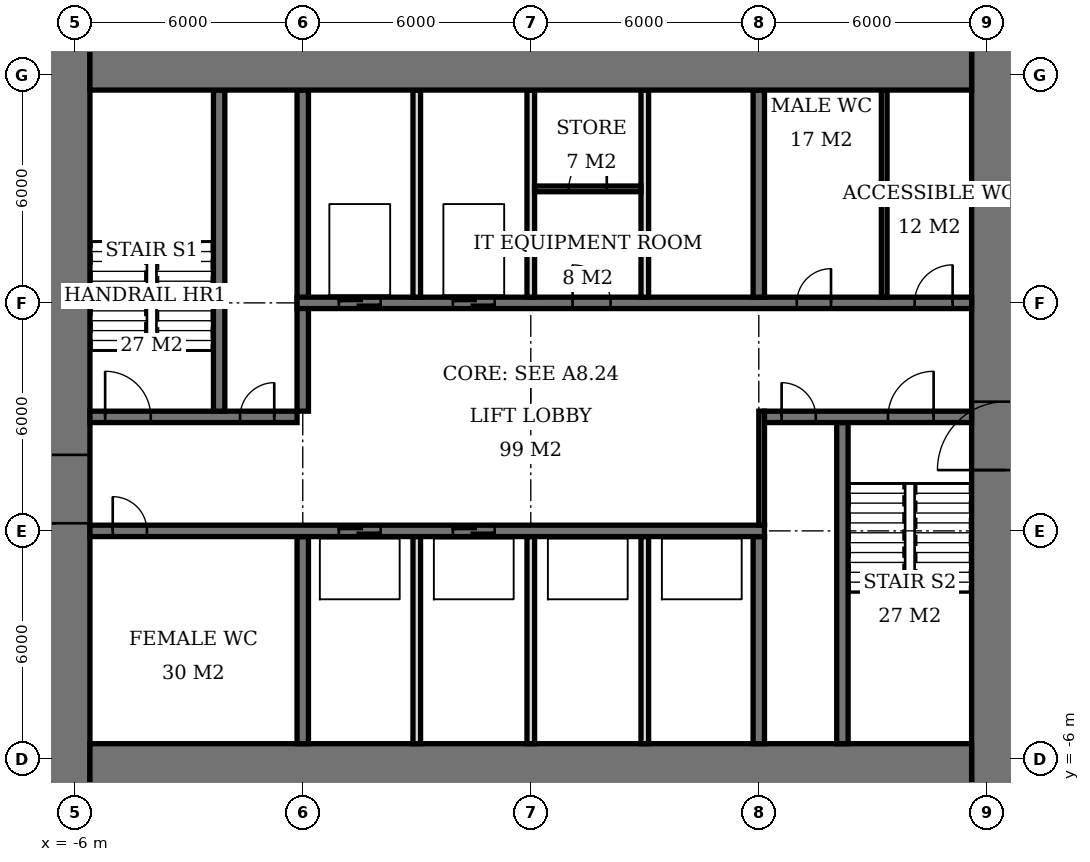
"""IFC4 building model, lengths in metres.
Left out: names, types, materials, properties, quantities, classifications, styles, units other than length and angle.
Written with IfcOpenShell. Run it as: python <this file> out.ifc"""

import sys

from ifc_helpers import new_model, si_unit, direction, frame, frame_2d, origin, place, context, subcontext, project, spatial, rectangle, extrude, element, fill, save


model = new_model("IFC4")
c1 = context("Model", 3, precision=1e-05, world=origin(), true_north=direction((0.0, 1.0)))
c2 = subcontext(c1, "Body", "Model", "MODEL_VIEW")
j1 = project(units=[si_unit("LENGTHUNIT", "METRE"), si_unit("PLANEANGLEUNIT", "RADIAN")], contexts=[c1])
p1 = place(None, origin())
s1 = spatial("IfcSite", under=j1, at=p1, CompositionType="ELEMENT")
p2 = place(p1, origin())
s2 = spatial("IfcBuilding", under=s1, at=p2, CompositionType="ELEMENT")
p3 = place(p2, frame((0.0, 0.0, 128.9)))
s3 = spatial("IfcBuildingStorey", under=s2, at=p3, CompositionType="ELEMENT", Elevation=128.9)
for number, where, z_axis, x_axis in (
    (1, (-5.6, -6.6, 0.0), (0.0, 0.0, 1.0), (1.0, 0.0, 0.0)),
    (2, (-5.6, 12.6, 0.0), (0.0, 0.0, 1.0), (1.0, 0.0, 0.0)),
):
    element("IfcWall", number, at=place(p3, frame(where, z_axis=z_axis, x_axis=x_axis)), inside=s3, PredefinedType="SHEAR", context=c2, shape_type="SweptSolid", body=[
        extrude(rectangle(XDim=23.2, YDim=2.0, at=frame_2d((11.6, 0.0))), origin(), (0.0, 0.0, 1.0), 3.9),
    ])
p4 = place(p3, frame((-6.5, -7.6, 0.0), z_axis=(0.0, 0.0, 1.0), x_axis=(0.0, 1.0, 0.0)))
e3 = element("IfcWall", 3, at=p4, inside=s3, PredefinedType="SHEAR", context=c2, shape_type="SweptSolid", body=[
    extrude(rectangle(XDim=21.2, YDim=1.8, at=frame_2d((10.6, 0.0))), origin(), (0.0, 0.0, 1.0), 3.9),
])
p5 = place(p4, frame((7.8, 0.0, 0.0)))
e4 = element("IfcOpeningElement", 4, at=p5, cuts=e3, PredefinedType="OPENING", context=c2, shape_type="SweptSolid", body=[
    extrude(rectangle(XDim=1.8, YDim=2.4, at=frame_2d((0.9, 1.2))), frame((0.0, 0.91, 0.0), z_axis=(0.0, -1.0, 0.0), x_axis=(1.0, 0.0, 0.0)), (0.0, 0.0, 1.0), 1.82),
])
p6 = place(p3, frame((18.5, -7.6, 0.0), z_axis=(0.0, 0.0, 1.0), x_axis=(0.0, 1.0, 0.0)))
e5 = element("IfcWall", 5, at=p6, inside=s3, PredefinedType="SHEAR", context=c2, shape_type="SweptSolid", body=[
    extrude(rectangle(XDim=21.2, YDim=1.8, at=frame_2d((10.6, 0.0))), origin(), (0.0, 0.0, 1.0), 3.9),
])
p7 = place(p6, frame((9.2, 0.0, 0.0)))
e6 = element("IfcOpeningElement", 6, at=p7, cuts=e5, PredefinedType="OPENING", context=c2, shape_type="SweptSolid", body=[
    extrude(rectangle(XDim=1.8, YDim=2.4, at=frame_2d((0.9, 1.2))), frame((0.0, 0.91, 0.0), z_axis=(0.0, -1.0, 0.0), x_axis=(1.0, 0.0, 0.0)), (0.0, 0.0, 1.0), 1.82),
])
p8 = place(p3, frame((-5.6, 0.0, 0.0), z_axis=(0.0, 0.0, 1.0), x_axis=(1.0, 0.0, 0.0)))
e7 = element("IfcWall", 7, at=p8, inside=s3, PredefinedType="SHEAR", context=c2, shape_type="SweptSolid", body=[
    extrude(rectangle(XDim=17.75, YDim=0.3, at=frame_2d((8.875, 0.0))), origin(), (0.0, 0.0, 1.0), 3.9),
])
p9 = place(p8, frame((0.6, 0.0, 0.0)))
e8 = element("IfcOpeningElement", 8, at=p9, cuts=e7, PredefinedType="OPENING", context=c2, shape_type="SweptSolid", body=[
    extrude(rectangle(XDim=0.9, YDim=2.1, at=frame_2d((0.45, 1.05))), frame((0.0, 0.16, 0.0), z_axis=(0.0, -1.0, 0.0), x_axis=(1.0, 0.0, 0.0)), (0.0, 0.0, 1.0), 0.32),
])
p10 = place(p8, frame((6.55, 0.0, 0.0)))
e9 = element("IfcOpeningElement", 9, at=p10, cuts=e7, PredefinedType="OPENING", context=c2, shape_type="SweptSolid", body=[
    extrude(rectangle(XDim=1.1, YDim=2.1, at=frame_2d((0.55, 1.05))), frame((0.0, 0.16, 0.0), z_axis=(0.0, -1.0, 0.0), x_axis=(1.0, 0.0, 0.0)), (0.0, 0.0, 1.0), 0.32),
])
p11 = place(p8, frame((9.55, 0.0, 0.0)))
e10 = element("IfcOpeningElement", 10, at=p11, cuts=e7, PredefinedType="OPENING", context=c2, shape_type="SweptSolid", body=[
    extrude(rectangle(XDim=1.1, YDim=2.1, at=frame_2d((0.55, 1.05))), frame((0.0, 0.16, 0.0), z_axis=(0.0, -1.0, 0.0), x_axis=(1.0, 0.0, 0.0)), (0.0, 0.0, 1.0), 0.32),
])
p12 = place(p3, frame((-5.6, 3.0, 0.0), z_axis=(0.0, 0.0, 1.0), x_axis=(1.0, 0.0, 0.0)))
e11 = element("IfcWall", 11, at=p12, inside=s3, PredefinedType="SHEAR", context=c2, shape_type="SweptSolid", body=[
    extrude(rectangle(XDim=5.45, YDim=0.3, at=frame_2d((2.725, 0.0))), origin(), (0.0, 0.0, 1.0), 3.9),
])
p13 = place(p12, frame((0.4, 0.0, 0.0)))
e12 = element("IfcOpeningElement", 12, at=p13, cuts=e11, PredefinedType="OPENING", context=c2, shape_type="SweptSolid", body=[
    extrude(rectangle(XDim=1.2, YDim=2.1, at=frame_2d((0.6, 1.05))), frame((0.0, 0.16, 0.0), z_axis=(0.0, -1.0, 0.0), x_axis=(1.0, 0.0, 0.0)), (0.0, 0.0, 1.0), 0.32),
])
p14 = place(p12, frame((3.95, 0.0, 0.0)))
e13 = element("IfcOpeningElement", 13, at=p14, cuts=e11, PredefinedType="OPENING", context=c2, shape_type="SweptSolid", body=[
    extrude(rectangle(XDim=0.9, YDim=2.1, at=frame_2d((0.45, 1.05))), frame((0.0, 0.16, 0.0), z_axis=(0.0, -1.0, 0.0), x_axis=(1.0, 0.0, 0.0)), (0.0, 0.0, 1.0), 0.32),
])
p15 = place(p3, frame((12.15, 3.0, 0.0), z_axis=(0.0, 0.0, 1.0), x_axis=(1.0, 0.0, 0.0)))
e14 = element("IfcWall", 14, at=p15, inside=s3, PredefinedType="SHEAR", context=c2, shape_type="SweptSolid", body=[
    extrude(rectangle(XDim=5.45, YDim=0.3, at=frame_2d((2.725, 0.0))), origin(), (0.0, 0.0, 1.0), 3.9),
])
p16 = place(p15, frame((3.25, 0.0, 0.0)))
e15 = element("IfcOpeningElement", 15, at=p16, cuts=e14, PredefinedType="OPENING", context=c2, shape_type="SweptSolid", body=[
    extrude(rectangle(XDim=1.2, YDim=2.1, at=frame_2d((0.6, 1.05))), frame((0.0, 0.16, 0.0), z_axis=(0.0, -1.0, 0.0), x_axis=(1.0, 0.0, 0.0)), (0.0, 0.0, 1.0), 0.32),
])
p17 = place(p15, frame((0.45, 0.0, 0.0)))
e16 = element("IfcOpeningElement", 16, at=p17, cuts=e14, PredefinedType="OPENING", context=c2, shape_type="SweptSolid", body=[
    extrude(rectangle(XDim=0.9, YDim=2.1, at=frame_2d((0.45, 1.05))), frame((0.0, 0.16, 0.0), z_axis=(0.0, -1.0, 0.0), x_axis=(1.0, 0.0, 0.0)), (0.0, 0.0, 1.0), 0.32),
])
p18 = place(p3, frame((-0.15, 6.0, 0.0), z_axis=(0.0, 0.0, 1.0), x_axis=(1.0, 0.0, 0.0)))
e17 = element("IfcWall", 17, at=p18, inside=s3, PredefinedType="SHEAR", context=c2, shape_type="SweptSolid", body=[
    extrude(rectangle(XDim=17.75, YDim=0.3, at=frame_2d((8.875, 0.0))), origin(), (0.0, 0.0, 1.0), 3.9),
])
p19 = place(p18, frame((13.15, 0.0, 0.0)))
e18 = element("IfcOpeningElement", 18, at=p19, cuts=e17, PredefinedType="OPENING", context=c2, shape_type="SweptSolid", body=[
    extrude(rectangle(XDim=0.9, YDim=2.1, at=frame_2d((0.45, 1.05))), frame((0.0, 0.16, 0.0), z_axis=(0.0, -1.0, 0.0), x_axis=(1.0, 0.0, 0.0)), (0.0, 0.0, 1.0), 0.32),
])
p20 = place(p18, frame((16.25, 0.0, 0.0)))
e19 = element("IfcOpeningElement", 19, at=p20, cuts=e17, PredefinedType="OPENING", context=c2, shape_type="SweptSolid", body=[
    extrude(rectangle(XDim=1.0, YDim=2.1, at=frame_2d((0.5, 1.05))), frame((0.0, 0.16, 0.0), z_axis=(0.0, -1.0, 0.0), x_axis=(1.0, 0.0, 0.0)), (0.0, 0.0, 1.0), 0.32),
])
p21 = place(p18, frame((7.25, 0.0, 0.0)))
e20 = element("IfcOpeningElement", 20, at=p21, cuts=e17, PredefinedType="OPENING", context=c2, shape_type="SweptSolid", body=[
    extrude(rectangle(XDim=1.0, YDim=2.1, at=frame_2d((0.5, 1.05))), frame((0.0, 0.16, 0.0), z_axis=(0.0, -1.0, 0.0), x_axis=(1.0, 0.0, 0.0)), (0.0, 0.0, 1.0), 0.32),
])
p22 = place(p18, frame((1.1, 0.0, 0.0)))
e21 = element("IfcOpeningElement", 21, at=p22, cuts=e17, PredefinedType="OPENING", context=c2, shape_type="SweptSolid", body=[
    extrude(rectangle(XDim=1.1, YDim=2.1, at=frame_2d((0.55, 1.05))), frame((0.0, 0.16, 0.0), z_axis=(0.0, -1.0, 0.0), x_axis=(1.0, 0.0, 0.0)), (0.0, 0.0, 1.0), 0.32),
])
p23 = place(p18, frame((4.1, 0.0, 0.0)))
e22 = element("IfcOpeningElement", 22, at=p23, cuts=e17, PredefinedType="OPENING", context=c2, shape_type="SweptSolid", body=[
    extrude(rectangle(XDim=1.1, YDim=2.1, at=frame_2d((0.55, 1.05))), frame((0.0, 0.16, 0.0), z_axis=(0.0, -1.0, 0.0), x_axis=(1.0, 0.0, 0.0)), (0.0, 0.0, 1.0), 0.32),
])
p24 = place(p3, frame((0.0, -5.6, 0.0), z_axis=(0.0, 0.0, 1.0), x_axis=(0.0, 1.0, 0.0)))
e23 = element("IfcWall", 23, at=p24, inside=s3, PredefinedType="SHEAR", context=c2, shape_type="SweptSolid", body=[
    extrude(rectangle(XDim=5.45, YDim=0.3, at=frame_2d((2.725, 0.0))), origin(), (0.0, 0.0, 1.0), 3.9),
])
p25 = place(p3, frame((0.0, 3.15, 0.0), z_axis=(0.0, 0.0, 1.0), x_axis=(0.0, 1.0, 0.0)))
e24 = element("IfcWall", 24, at=p25, inside=s3, PredefinedType="SHEAR", context=c2, shape_type="SweptSolid", body=[
    extrude(rectangle(XDim=8.45, YDim=0.3, at=frame_2d((4.225, 0.0))), origin(), (0.0, 0.0, 1.0), 3.9),
])
for number, where, z_axis, x_axis in (
    (25, (12.0, -5.6, 0.0), (0.0, 0.0, 1.0), (0.0, 1.0, 0.0)),
    (26, (12.0, 6.15, 0.0), (0.0, 0.0, 1.0), (0.0, 1.0, 0.0)),
):
    element("IfcWall", number, at=place(p3, frame(where, z_axis=z_axis, x_axis=x_axis)), inside=s3, PredefinedType="SHEAR", context=c2, shape_type="SweptSolid", body=[
        extrude(rectangle(XDim=5.45, YDim=0.3, at=frame_2d((2.725, 0.0))), origin(), (0.0, 0.0, 1.0), 3.9),
    ])
for number, where, z_axis, x_axis in (
    (27, (-2.2, 3.15, 0.0), (0.0, 0.0, 1.0), (0.0, 1.0, 0.0)),
    (28, (14.2, -5.6, 0.0), (0.0, 0.0, 1.0), (0.0, 1.0, 0.0)),
):
    element("IfcWall", number, at=place(p3, frame(where, z_axis=z_axis, x_axis=x_axis)), inside=s3, PredefinedType="SHEAR", context=c2, shape_type="SweptSolid", body=[
        extrude(rectangle(XDim=8.45, YDim=0.3, at=frame_2d((4.225, 0.0))), origin(), (0.0, 0.0, 1.0), 3.9),
    ])
for number, where, z_axis, x_axis in (
    (29, (3.0, 6.15, 0.0), (0.0, 0.0, 1.0), (0.0, 1.0, 0.0)),
    (30, (6.0, 6.15, 0.0), (0.0, 0.0, 1.0), (0.0, 1.0, 0.0)),
    (31, (9.0, 6.15, 0.0), (0.0, 0.0, 1.0), (0.0, 1.0, 0.0)),
    (32, (3.0, -5.6, 0.0), (0.0, 0.0, 1.0), (0.0, 1.0, 0.0)),
    (33, (6.0, -5.6, 0.0), (0.0, 0.0, 1.0), (0.0, 1.0, 0.0)),
    (34, (9.0, -5.6, 0.0), (0.0, 0.0, 1.0), (0.0, 1.0, 0.0)),
):
    element("IfcWall", number, at=place(p3, frame(where, z_axis=z_axis, x_axis=x_axis)), inside=s3, PredefinedType="SOLIDWALL", context=c2, shape_type="SweptSolid", body=[
        extrude(rectangle(XDim=5.45, YDim=0.2, at=frame_2d((2.725, 0.0))), origin(), (0.0, 0.0, 1.0), 3.9),
    ])
p26 = place(p3, frame((15.3, 6.15, 0.0), z_axis=(0.0, 0.0, 1.0), x_axis=(0.0, 1.0, 0.0)))
e35 = element("IfcWall", 35, at=p26, inside=s3, PredefinedType="PLUMBINGWALL", context=c2, shape_type="SweptSolid", body=[
    extrude(rectangle(XDim=5.45, YDim=0.15, at=frame_2d((2.725, 0.0))), origin(), (0.0, 0.0, 1.0), 3.65),
])
p27 = place(p3, frame((6.1, 9.0, 0.0), z_axis=(0.0, 0.0, 1.0), x_axis=(1.0, 0.0, 0.0)))
e36 = element("IfcWall", 36, at=p27, inside=s3, PredefinedType="PARTITIONING", context=c2, shape_type="SweptSolid", body=[
    extrude(rectangle(XDim=2.8, YDim=0.15, at=frame_2d((1.4, 0.0))), origin(), (0.0, 0.0, 1.0), 3.65),
])
p28 = place(p27, frame((0.9, 0.0, 0.0)))
e37 = element("IfcOpeningElement", 37, at=p28, cuts=e36, PredefinedType="OPENING", context=c2, shape_type="SweptSolid", body=[
    extrude(rectangle(XDim=1.0, YDim=2.1, at=frame_2d((0.5, 1.05))), frame((0.0, 0.085, 0.0), z_axis=(0.0, -1.0, 0.0), x_axis=(1.0, 0.0, 0.0)), (0.0, 0.0, 1.0), 0.17),
])
p29 = place(p3, frame((12.075, 0.15, 0.0), z_axis=(0.0, 0.0, 1.0), x_axis=(0.0, 1.0, 0.0)))
e38 = element("IfcWall", 38, at=p29, inside=s3, PredefinedType="PARTITIONING", context=c2, shape_type="SweptSolid", body=[
    extrude(rectangle(XDim=3.0, YDim=0.15, at=frame_2d((1.5, 0.0))), origin(), (0.0, 0.0, 1.0), 3.65),
])
p30 = place(p5, origin())
e39 = element("IfcDoor", 39, at=p30, inside=s3, OperationType="DOUBLE_DOOR_SINGLE_SWING", PredefinedType="DOOR", context=c2, shape_type="SweptSolid", body=[
    extrude(rectangle(XDim=1.8, YDim=2.4, at=frame_2d((0.9, 1.2))), frame((0.0, 0.025, 0.0), z_axis=(0.0, -1.0, 0.0), x_axis=(1.0, 0.0, 0.0)), (0.0, 0.0, 1.0), 0.05),
])
fill(e4, e39)
p31 = place(p7, origin())
e40 = element("IfcDoor", 40, at=p31, inside=s3, OperationType="DOUBLE_DOOR_SINGLE_SWING", PredefinedType="DOOR", context=c2, shape_type="SweptSolid", body=[
    extrude(rectangle(XDim=1.8, YDim=2.4, at=frame_2d((0.9, 1.2))), frame((0.0, 0.025, 0.0), z_axis=(0.0, -1.0, 0.0), x_axis=(1.0, 0.0, 0.0)), (0.0, 0.0, 1.0), 0.05),
])
fill(e6, e40)
p32 = place(p13, origin())
e41 = element("IfcDoor", 41, at=p32, inside=s3, OperationType="SINGLE_SWING_LEFT", PredefinedType="DOOR", context=c2, shape_type="SweptSolid", body=[
    extrude(rectangle(XDim=1.2, YDim=2.1, at=frame_2d((0.6, 1.05))), frame((0.0, 0.025, 0.0), z_axis=(0.0, -1.0, 0.0), x_axis=(1.0, 0.0, 0.0)), (0.0, 0.0, 1.0), 0.05),
])
fill(e12, e41)
p33 = place(p14, origin())
e42 = element("IfcDoor", 42, at=p33, inside=s3, OperationType="SINGLE_SWING_RIGHT", PredefinedType="DOOR", context=c2, shape_type="SweptSolid", body=[
    extrude(rectangle(XDim=0.9, YDim=2.1, at=frame_2d((0.45, 1.05))), frame((0.0, 0.025, 0.0), z_axis=(0.0, -1.0, 0.0), x_axis=(1.0, 0.0, 0.0)), (0.0, 0.0, 1.0), 0.05),
])
fill(e13, e42)
p34 = place(p16, origin())
e43 = element("IfcDoor", 43, at=p34, inside=s3, OperationType="SINGLE_SWING_RIGHT", PredefinedType="DOOR", context=c2, shape_type="SweptSolid", body=[
    extrude(rectangle(XDim=1.2, YDim=2.1, at=frame_2d((0.6, 1.05))), frame((0.0, 0.025, 0.0), z_axis=(0.0, -1.0, 0.0), x_axis=(1.0, 0.0, 0.0)), (0.0, 0.0, 1.0), 0.05),
])
fill(e15, e43)
p35 = place(p17, origin())
e44 = element("IfcDoor", 44, at=p35, inside=s3, OperationType="SINGLE_SWING_LEFT", PredefinedType="DOOR", context=c2, shape_type="SweptSolid", body=[
    extrude(rectangle(XDim=0.9, YDim=2.1, at=frame_2d((0.45, 1.05))), frame((0.0, 0.025, 0.0), z_axis=(0.0, -1.0, 0.0), x_axis=(1.0, 0.0, 0.0)), (0.0, 0.0, 1.0), 0.05),
])
fill(e16, e44)
p36 = place(p9, origin())
e45 = element("IfcDoor", 45, at=p36, inside=s3, OperationType="SINGLE_SWING_LEFT", PredefinedType="DOOR", context=c2, shape_type="SweptSolid", body=[
    extrude(rectangle(XDim=0.9, YDim=2.1, at=frame_2d((0.45, 1.05))), frame((0.0, 0.025, 0.0), z_axis=(0.0, -1.0, 0.0), x_axis=(1.0, 0.0, 0.0)), (0.0, 0.0, 1.0), 0.05),
])
fill(e8, e45)
p37 = place(p19, origin())
e46 = element("IfcDoor", 46, at=p37, inside=s3, OperationType="SINGLE_SWING_RIGHT", PredefinedType="DOOR", context=c2, shape_type="SweptSolid", body=[
    extrude(rectangle(XDim=0.9, YDim=2.1, at=frame_2d((0.45, 1.05))), frame((0.0, 0.025, 0.0), z_axis=(0.0, -1.0, 0.0), x_axis=(1.0, 0.0, 0.0)), (0.0, 0.0, 1.0), 0.05),
])
fill(e18, e46)
p38 = place(p20, origin())
e47 = element("IfcDoor", 47, at=p38, inside=s3, OperationType="SINGLE_SWING_RIGHT", PredefinedType="DOOR", context=c2, shape_type="SweptSolid", body=[
    extrude(rectangle(XDim=1.0, YDim=2.1, at=frame_2d((0.5, 1.05))), frame((0.0, 0.025, 0.0), z_axis=(0.0, -1.0, 0.0), x_axis=(1.0, 0.0, 0.0)), (0.0, 0.0, 1.0), 0.05),
])
fill(e19, e47)
p39 = place(p28, origin())
e48 = element("IfcDoor", 48, at=p39, inside=s3, OperationType="SINGLE_SWING_RIGHT", PredefinedType="DOOR", context=c2, shape_type="SweptSolid", body=[
    extrude(rectangle(XDim=1.0, YDim=2.1, at=frame_2d((0.5, 1.05))), frame((0.0, 0.025, 0.0), z_axis=(0.0, -1.0, 0.0), x_axis=(1.0, 0.0, 0.0)), (0.0, 0.0, 1.0), 0.05),
])
fill(e37, e48)
p40 = place(p21, origin())
e49 = element("IfcDoor", 49, at=p40, inside=s3, OperationType="SINGLE_SWING_LEFT", PredefinedType="DOOR", context=c2, shape_type="SweptSolid", body=[
    extrude(rectangle(XDim=1.0, YDim=2.1, at=frame_2d((0.5, 1.05))), frame((0.0, 0.025, 0.0), z_axis=(0.0, -1.0, 0.0), x_axis=(1.0, 0.0, 0.0)), (0.0, 0.0, 1.0), 0.05),
])
fill(e20, e49)
p41 = place(p22, origin())
e50 = element("IfcDoor", 50, at=p41, inside=s3, OperationType="DOUBLE_DOOR_SLIDING", PredefinedType="USERDEFINED", context=c2, shape_type="SweptSolid", body=[
    extrude(rectangle(XDim=1.1, YDim=2.1, at=frame_2d((0.55, 1.05))), frame((0.0, 0.025, 0.0), z_axis=(0.0, -1.0, 0.0), x_axis=(1.0, 0.0, 0.0)), (0.0, 0.0, 1.0), 0.05),
])
fill(e21, e50)
p42 = place(p23, origin())
e51 = element("IfcDoor", 51, at=p42, inside=s3, OperationType="DOUBLE_DOOR_SLIDING", PredefinedType="USERDEFINED", context=c2, shape_type="SweptSolid", body=[
    extrude(rectangle(XDim=1.1, YDim=2.1, at=frame_2d((0.55, 1.05))), frame((0.0, 0.025, 0.0), z_axis=(0.0, -1.0, 0.0), x_axis=(1.0, 0.0, 0.0)), (0.0, 0.0, 1.0), 0.05),
])
fill(e22, e51)
p43 = place(p10, origin())
e52 = element("IfcDoor", 52, at=p43, inside=s3, OperationType="DOUBLE_DOOR_SLIDING", PredefinedType="USERDEFINED", context=c2, shape_type="SweptSolid", body=[
    extrude(rectangle(XDim=1.1, YDim=2.1, at=frame_2d((0.55, 1.05))), frame((0.0, 0.025, 0.0), z_axis=(0.0, -1.0, 0.0), x_axis=(1.0, 0.0, 0.0)), (0.0, 0.0, 1.0), 0.05),
])
fill(e9, e52)
p44 = place(p11, origin())
e53 = element("IfcDoor", 53, at=p44, inside=s3, OperationType="DOUBLE_DOOR_SLIDING", PredefinedType="USERDEFINED", context=c2, shape_type="SweptSolid", body=[
    extrude(rectangle(XDim=1.1, YDim=2.1, at=frame_2d((0.55, 1.05))), frame((0.0, 0.025, 0.0), z_axis=(0.0, -1.0, 0.0), x_axis=(1.0, 0.0, 0.0)), (0.0, 0.0, 1.0), 0.05),
])
fill(e10, e53)
save(model, sys.argv[1])
